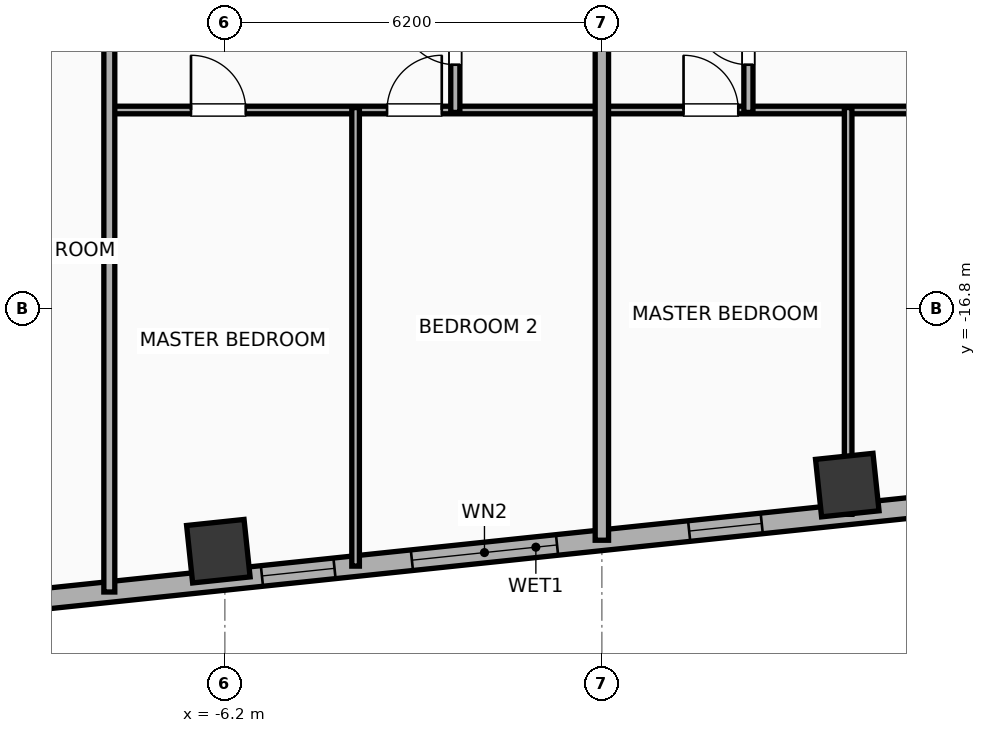
"""IFC4 building model, lengths in metres.
Left out: names, types, materials, properties, quantities, classifications, styles, units other than length and angle.
Written with IfcOpenShell. Run it as: python <this file> out.ifc"""

import sys

from ifc_helpers import new_model, si_unit, direction, frame, frame_2d, origin, origin_2d, place, context, subcontext, project, spatial, rectangle, hollow_rectangle, extrude, element, fill, save


model = new_model("IFC4")
c1 = context("Model", 3, precision=1e-05, world=origin(), true_north=direction((0.0, 1.0)))
c2 = subcontext(c1, "Body", "Model", "MODEL_VIEW")
j1 = project(units=[si_unit("LENGTHUNIT", "METRE"), si_unit("PLANEANGLEUNIT", "RADIAN")], contexts=[c1])
p1 = place(None, origin())
s1 = spatial("IfcSite", under=j1, at=p1, CompositionType="ELEMENT")
p2 = place(p1, origin())
s2 = spatial("IfcBuilding", under=s1, at=p2, CompositionType="ELEMENT")
p3 = place(p2, frame((0.0, 0.0, 187.2)))
s3 = spatial("IfcBuildingStorey", under=s2, at=p3, CompositionType="ELEMENT", Elevation=187.2)
for number, where, z_axis, x_axis in (
    (1, (-6.307, -20.785, 0.0), (0.0, 0.0, 1.0), (0.995, 0.105, 0.0)),
    (2, (4.036, -19.698, 0.0), (0.0, 0.0, 1.0), (0.995, 0.105, 0.0)),
):
    element("IfcColumn", number, at=place(p3, frame(where, z_axis=z_axis, x_axis=x_axis)), inside=s3, PredefinedType="COLUMN", context=c2, shape_type="SweptSolid", body=[
        extrude(hollow_rectangle(XDim=0.95, YDim=0.95, WallThickness=0.032, at=origin_2d()), origin(), (0.0, 0.0, 1.0), 3.9),
    ])
p4 = place(p3, frame((24.756, -18.003, 0.0), z_axis=(0.0, 0.0, 1.0), x_axis=(-0.99452160744, -0.104531202687, 0.0)))
e3 = element("IfcWall", 3, at=p4, inside=s3, PredefinedType="ELEMENTEDWALL", context=c2, shape_type="SweptSolid", body=[
    extrude(rectangle(XDim=51.967, YDim=0.34, at=frame_2d((25.983, 0.0))), origin(), (0.0, 0.0, 1.0), 3.65),
])
p5 = place(p4, frame((25.633, 0.0, 0.75)))
e4 = element("IfcOpeningElement", 4, at=p5, cuts=e3, PredefinedType="OPENING", context=c2, shape_type="SweptSolid", body=[
    extrude(rectangle(XDim=2.4, YDim=2.1, at=frame_2d((1.2, 1.05))), frame((0.0, 0.18, 0.0), z_axis=(0.0, -1.0, 0.0), x_axis=(1.0, 0.0, 0.0)), (0.0, 0.0, 1.0), 0.36),
])
p6 = place(p4, frame((42.369, 0.0, 0.75)))
e5 = element("IfcOpeningElement", 5, at=p6, cuts=e3, PredefinedType="OPENING", context=c2, shape_type="SweptSolid", body=[
    extrude(rectangle(XDim=1.2, YDim=2.05, at=frame_2d((0.6, 1.025))), frame((0.0, 0.18, 0.0), z_axis=(0.0, -1.0, 0.0), x_axis=(1.0, 0.0, 0.0)), (0.0, 0.0, 1.0), 0.36),
])
p7 = place(p4, frame((34.085, 0.0, 0.75)))
e6 = element("IfcOpeningElement", 6, at=p7, cuts=e3, PredefinedType="OPENING", context=c2, shape_type="SweptSolid", body=[
    extrude(rectangle(XDim=1.2, YDim=2.05, at=frame_2d((0.6, 1.025))), frame((0.0, 0.18, 0.0), z_axis=(0.0, -1.0, 0.0), x_axis=(1.0, 0.0, 0.0)), (0.0, 0.0, 1.0), 0.36),
])
p8 = place(p4, frame((36.993, 0.0, 0.75)))
e7 = element("IfcOpeningElement", 7, at=p8, cuts=e3, PredefinedType="OPENING", context=c2, shape_type="SweptSolid", body=[
    extrude(rectangle(XDim=1.2, YDim=2.05, at=frame_2d((0.6, 1.025))), frame((0.0, 0.18, 0.0), z_axis=(0.0, -1.0, 0.0), x_axis=(1.0, 0.0, 0.0)), (0.0, 0.0, 1.0), 0.36),
])
p9 = place(p4, frame((14.397, 0.0, 0.75)))
e8 = element("IfcOpeningElement", 8, at=p9, cuts=e3, PredefinedType="OPENING", context=c2, shape_type="SweptSolid", body=[
    extrude(rectangle(XDim=1.2, YDim=2.05, at=frame_2d((0.6, 1.025))), frame((0.0, 0.18, 0.0), z_axis=(0.0, -1.0, 0.0), x_axis=(1.0, 0.0, 0.0)), (0.0, 0.0, 1.0), 0.36),
])
p10 = place(p4, frame((11.489, 0.0, 0.75)))
e9 = element("IfcOpeningElement", 9, at=p10, cuts=e3, PredefinedType="OPENING", context=c2, shape_type="SweptSolid", body=[
    extrude(rectangle(XDim=1.2, YDim=2.05, at=frame_2d((0.6, 1.025))), frame((0.0, 0.18, 0.0), z_axis=(0.0, -1.0, 0.0), x_axis=(1.0, 0.0, 0.0)), (0.0, 0.0, 1.0), 0.36),
])
p11 = place(p4, frame((8.521, 0.0, 0.75)))
e10 = element("IfcOpeningElement", 10, at=p11, cuts=e3, PredefinedType="OPENING", context=c2, shape_type="SweptSolid", body=[
    extrude(rectangle(XDim=1.2, YDim=2.05, at=frame_2d((0.6, 1.025))), frame((0.0, 0.18, 0.0), z_axis=(0.0, -1.0, 0.0), x_axis=(1.0, 0.0, 0.0)), (0.0, 0.0, 1.0), 0.36),
])
p12 = place(p4, frame((5.582, 0.0, 0.75)))
e11 = element("IfcOpeningElement", 11, at=p12, cuts=e3, PredefinedType="OPENING", context=c2, shape_type="SweptSolid", body=[
    extrude(rectangle(XDim=1.2, YDim=2.05, at=frame_2d((0.6, 1.025))), frame((0.0, 0.18, 0.0), z_axis=(0.0, -1.0, 0.0), x_axis=(1.0, 0.0, 0.0)), (0.0, 0.0, 1.0), 0.36),
])
p13 = place(p4, frame((29.313, 0.0, 0.75)))
e12 = element("IfcOpeningElement", 12, at=p13, cuts=e3, PredefinedType="OPENING", context=c2, shape_type="SweptSolid", body=[
    extrude(rectangle(XDim=1.2, YDim=2.05, at=frame_2d((0.6, 1.025))), frame((0.0, 0.18, 0.0), z_axis=(0.0, -1.0, 0.0), x_axis=(1.0, 0.0, 0.0)), (0.0, 0.0, 1.0), 0.36),
])
p14 = place(p4, frame((22.248, 0.0, 0.75)))
e13 = element("IfcOpeningElement", 13, at=p14, cuts=e3, PredefinedType="OPENING", context=c2, shape_type="SweptSolid", body=[
    extrude(rectangle(XDim=1.2, YDim=2.05, at=frame_2d((0.6, 1.025))), frame((0.0, 0.18, 0.0), z_axis=(0.0, -1.0, 0.0), x_axis=(1.0, 0.0, 0.0)), (0.0, 0.0, 1.0), 0.36),
])
p15 = place(p4, frame((18.186, 0.0, 0.75)))
e14 = element("IfcOpeningElement", 14, at=p15, cuts=e3, PredefinedType="OPENING", context=c2, shape_type="SweptSolid", body=[
    extrude(rectangle(XDim=1.2, YDim=2.05, at=frame_2d((0.6, 1.025))), frame((0.0, 0.18, 0.0), z_axis=(0.0, -1.0, 0.0), x_axis=(1.0, 0.0, 0.0)), (0.0, 0.0, 1.0), 0.36),
])
p16 = place(p4, frame((47.879, 0.0, 0.75)))
e15 = element("IfcOpeningElement", 15, at=p16, cuts=e3, PredefinedType="OPENING", context=c2, shape_type="SweptSolid", body=[
    extrude(rectangle(XDim=1.2, YDim=2.05, at=frame_2d((0.6, 1.025))), frame((0.0, 0.18, 0.0), z_axis=(0.0, -1.0, 0.0), x_axis=(1.0, 0.0, 0.0)), (0.0, 0.0, 1.0), 0.36),
])
p17 = place(p4, frame((49.844, 0.0, 0.75)))
e16 = element("IfcOpeningElement", 16, at=p17, cuts=e3, PredefinedType="OPENING", context=c2, shape_type="SweptSolid", body=[
    extrude(rectangle(XDim=1.2, YDim=2.05, at=frame_2d((0.6, 1.025))), frame((0.0, 0.18, 0.0), z_axis=(0.0, -1.0, 0.0), x_axis=(1.0, 0.0, 0.0)), (0.0, 0.0, 1.0), 0.36),
])
p18 = place(p4, frame((0.925, 0.0, 0.75)))
e17 = element("IfcOpeningElement", 17, at=p18, cuts=e3, PredefinedType="OPENING", context=c2, shape_type="SweptSolid", body=[
    extrude(rectangle(XDim=1.2, YDim=2.05, at=frame_2d((0.6, 1.025))), frame((0.0, 0.18, 0.0), z_axis=(0.0, -1.0, 0.0), x_axis=(1.0, 0.0, 0.0)), (0.0, 0.0, 1.0), 0.36),
])
p19 = place(p3, frame((-8.08, -13.53, 0.0), z_axis=(0.0, 0.0, 1.0), x_axis=(1.0, 0.0, 0.0)))
e18 = element("IfcWall", 18, at=p19, inside=s3, PredefinedType="PARTITIONING", context=c2, shape_type="SweptSolid", body=[
    extrude(rectangle(XDim=8.06, YDim=0.125, at=frame_2d((4.03, 0.0))), origin(), (0.0, 0.0, 1.0), 3.65),
])
p20 = place(p19, frame((1.323, 0.0, 0.0)))
e19 = element("IfcOpeningElement", 19, at=p20, cuts=e18, PredefinedType="OPENING", context=c2, shape_type="SweptSolid", body=[
    extrude(rectangle(XDim=0.9, YDim=2.05, at=frame_2d((0.45, 1.025))), frame((0.0, 0.073, 0.0), z_axis=(0.0, -1.0, 0.0), x_axis=(1.0, 0.0, 0.0)), (0.0, 0.0, 1.0), 0.145),
])
p21 = place(p19, frame((4.547, 0.0, 0.0)))
e20 = element("IfcOpeningElement", 20, at=p21, cuts=e18, PredefinedType="OPENING", context=c2, shape_type="SweptSolid", body=[
    extrude(rectangle(XDim=0.9, YDim=2.05, at=frame_2d((0.45, 1.025))), frame((0.0, 0.073, 0.0), z_axis=(0.0, -1.0, 0.0), x_axis=(1.0, 0.0, 0.0)), (0.0, 0.0, 1.0), 0.145),
])
p22 = place(p3, frame((-2.41, -13.57, 0.0), z_axis=(0.0, 0.0, 1.0), x_axis=(0.0, 1.0, 0.0)))
e21 = element("IfcWall", 21, at=p22, inside=s3, PredefinedType="PLUMBINGWALL", context=c2, shape_type="SweptSolid", body=[
    extrude(rectangle(XDim=2.47, YDim=0.15, at=frame_2d((1.235, 0.0))), origin(), (0.0, 0.0, 1.0), 3.65),
])
p23 = place(p22, frame((0.785, 0.0, 0.0)))
e22 = element("IfcOpeningElement", 22, at=p23, cuts=e21, PredefinedType="OPENING", context=c2, shape_type="SweptSolid", body=[
    extrude(rectangle(XDim=0.9, YDim=2.05, at=frame_2d((0.45, 1.025))), frame((0.0, 0.085, 0.0), z_axis=(0.0, -1.0, 0.0), x_axis=(1.0, 0.0, 0.0)), (0.0, 0.0, 1.0), 0.17),
])
p24 = place(p3, frame((-4.05, -21.031, 0.0), z_axis=(0.0, 0.0, 1.0), x_axis=(0.0, 1.0, 0.0)))
e23 = element("IfcWall", 23, at=p24, inside=s3, PredefinedType="PARTITIONING", context=c2, shape_type="SweptSolid", body=[
    extrude(rectangle(XDim=7.541, YDim=0.125, at=frame_2d((3.771, 0.0))), origin(), (0.0, 0.0, 1.0), 3.65),
])
p25 = place(p3, frame((-8.1, -21.456, 0.0), z_axis=(0.0, 0.0, 1.0), x_axis=(0.0, 1.0, 0.0)))
e24 = element("IfcWall", 24, at=p25, inside=s3, PredefinedType="PARTITIONING", context=c2, shape_type="SweptSolid", body=[
    extrude(rectangle(XDim=12.766, YDim=0.18, at=frame_2d((6.383, 0.0))), origin(), (0.0, 0.0, 1.0), 3.65),
])
p26 = place(p25, frame((11.516, 0.0, 0.0)))
e25 = element("IfcOpeningElement", 25, at=p26, cuts=e24, PredefinedType="OPENING", context=c2, shape_type="SweptSolid", body=[
    extrude(rectangle(XDim=0.9, YDim=2.05, at=frame_2d((0.45, 1.025))), frame((0.0, 0.1, 0.0), z_axis=(0.0, -1.0, 0.0), x_axis=(1.0, 0.0, 0.0)), (0.0, 0.0, 1.0), 0.2),
])
p27 = place(p3, frame((0.02, -13.53, 0.0), z_axis=(0.0, 0.0, 1.0), x_axis=(1.0, 0.0, 0.0)))
e26 = element("IfcWall", 26, at=p27, inside=s3, PredefinedType="PARTITIONING", context=c2, shape_type="SweptSolid", body=[
    extrude(rectangle(XDim=8.06, YDim=0.125, at=frame_2d((4.03, 0.0))), origin(), (0.0, 0.0, 1.0), 3.65),
])
p28 = place(p27, frame((1.323, 0.0, 0.0)))
e27 = element("IfcOpeningElement", 27, at=p28, cuts=e26, PredefinedType="OPENING", context=c2, shape_type="SweptSolid", body=[
    extrude(rectangle(XDim=0.9, YDim=2.05, at=frame_2d((0.45, 1.025))), frame((0.0, 0.073, 0.0), z_axis=(0.0, -1.0, 0.0), x_axis=(1.0, 0.0, 0.0)), (0.0, 0.0, 1.0), 0.145),
])
p29 = place(p27, frame((5.837, 0.0, 0.0)))
e28 = element("IfcOpeningElement", 28, at=p29, cuts=e26, PredefinedType="OPENING", context=c2, shape_type="SweptSolid", body=[
    extrude(rectangle(XDim=0.9, YDim=2.05, at=frame_2d((0.45, 1.025))), frame((0.0, 0.073, 0.0), z_axis=(0.0, -1.0, 0.0), x_axis=(1.0, 0.0, 0.0)), (0.0, 0.0, 1.0), 0.145),
])
p30 = place(p3, frame((2.41, -13.57, 0.0), z_axis=(0.0, 0.0, 1.0), x_axis=(0.0, 1.0, 0.0)))
e29 = element("IfcWall", 29, at=p30, inside=s3, PredefinedType="PLUMBINGWALL", context=c2, shape_type="SweptSolid", body=[
    extrude(rectangle(XDim=2.47, YDim=0.15, at=frame_2d((1.235, 0.0))), origin(), (0.0, 0.0, 1.0), 3.65),
])
p31 = place(p30, frame((0.785, 0.0, 0.0)))
e30 = element("IfcOpeningElement", 30, at=p31, cuts=e29, PredefinedType="OPENING", context=c2, shape_type="SweptSolid", body=[
    extrude(rectangle(XDim=0.9, YDim=2.05, at=frame_2d((0.45, 1.025))), frame((0.0, 0.085, 0.0), z_axis=(0.0, -1.0, 0.0), x_axis=(1.0, 0.0, 0.0)), (0.0, 0.0, 1.0), 0.17),
])
p32 = place(p3, frame((4.05, -20.179, 0.0), z_axis=(0.0, 0.0, 1.0), x_axis=(0.0, 1.0, 0.0)))
e31 = element("IfcWall", 31, at=p32, inside=s3, PredefinedType="PARTITIONING", context=c2, shape_type="SweptSolid", body=[
    extrude(rectangle(XDim=6.689, YDim=0.125, at=frame_2d((3.345, 0.0))), origin(), (0.0, 0.0, 1.0), 3.04),
])
p33 = place(p3, frame((0.0, -20.605, 0.0), z_axis=(0.0, 0.0, 1.0), x_axis=(0.0, 1.0, 0.0)))
e32 = element("IfcWall", 32, at=p33, inside=s3, PredefinedType="PARTITIONING", context=c2, shape_type="SweptSolid", body=[
    extrude(rectangle(XDim=11.915, YDim=0.22, at=frame_2d((5.958, 0.0))), origin(), (0.0, 0.0, 1.0), 3.65),
])
p34 = place(p5, origin())
e33 = element("IfcWindow", 33, at=p34, inside=s3, PartitioningType="SINGLE_PANEL", PredefinedType="WINDOW", context=c2, shape_type="SweptSolid", body=[
    extrude(rectangle(XDim=2.4, YDim=2.1, at=frame_2d((1.2, 1.05))), frame((0.0, 0.03, 0.0), z_axis=(0.0, -1.0, 0.0), x_axis=(1.0, 0.0, 0.0)), (0.0, 0.0, 1.0), 0.06),
])
fill(e4, e33)
p35 = place(p13, origin())
e34 = element("IfcWindow", 34, at=p35, inside=s3, PartitioningType="SINGLE_PANEL", PredefinedType="WINDOW", context=c2, shape_type="SweptSolid", body=[
    extrude(rectangle(XDim=1.2, YDim=2.05, at=frame_2d((0.6, 1.025))), frame((0.0, 0.03, 0.0), z_axis=(0.0, -1.0, 0.0), x_axis=(1.0, 0.0, 0.0)), (0.0, 0.0, 1.0), 0.06),
])
fill(e12, e34)
p36 = place(p14, origin())
e35 = element("IfcWindow", 35, at=p36, inside=s3, PartitioningType="SINGLE_PANEL", PredefinedType="WINDOW", context=c2, shape_type="SweptSolid", body=[
    extrude(rectangle(XDim=1.2, YDim=2.05, at=frame_2d((0.6, 1.025))), frame((0.0, 0.03, 0.0), z_axis=(0.0, -1.0, 0.0), x_axis=(1.0, 0.0, 0.0)), (0.0, 0.0, 1.0), 0.06),
])
fill(e13, e35)
p37 = place(p20, origin())
e36 = element("IfcDoor", 36, at=p37, inside=s3, OperationType="SINGLE_SWING_LEFT", PredefinedType="DOOR", context=c2, shape_type="SweptSolid", body=[
    extrude(rectangle(XDim=0.9, YDim=2.05, at=frame_2d((0.45, 1.025))), frame((0.0, 0.025, 0.0), z_axis=(0.0, -1.0, 0.0), x_axis=(1.0, 0.0, 0.0)), (0.0, 0.0, 1.0), 0.05),
])
fill(e19, e36)
p38 = place(p21, origin())
e37 = element("IfcDoor", 37, at=p38, inside=s3, OperationType="SINGLE_SWING_RIGHT", PredefinedType="DOOR", context=c2, shape_type="SweptSolid", body=[
    extrude(rectangle(XDim=0.9, YDim=2.05, at=frame_2d((0.45, 1.025))), frame((0.0, 0.025, 0.0), z_axis=(0.0, -1.0, 0.0), x_axis=(1.0, 0.0, 0.0)), (0.0, 0.0, 1.0), 0.05),
])
fill(e20, e37)
p39 = place(p23, origin())
e38 = element("IfcDoor", 38, at=p39, inside=s3, OperationType="SINGLE_SWING_RIGHT", PredefinedType="DOOR", context=c2, shape_type="SweptSolid", body=[
    extrude(rectangle(XDim=0.9, YDim=2.05, at=frame_2d((0.45, 1.025))), frame((0.0, 0.025, 0.0), z_axis=(0.0, -1.0, 0.0), x_axis=(1.0, 0.0, 0.0)), (0.0, 0.0, 1.0), 0.05),
])
fill(e22, e38)
p40 = place(p28, origin())
e39 = element("IfcDoor", 39, at=p40, inside=s3, OperationType="SINGLE_SWING_LEFT", PredefinedType="DOOR", context=c2, shape_type="SweptSolid", body=[
    extrude(rectangle(XDim=0.9, YDim=2.05, at=frame_2d((0.45, 1.025))), frame((0.0, 0.025, 0.0), z_axis=(0.0, -1.0, 0.0), x_axis=(1.0, 0.0, 0.0)), (0.0, 0.0, 1.0), 0.05),
])
fill(e27, e39)
p41 = place(p31, origin())
e40 = element("IfcDoor", 40, at=p41, inside=s3, OperationType="SINGLE_SWING_RIGHT", PredefinedType="DOOR", context=c2, shape_type="SweptSolid", body=[
    extrude(rectangle(XDim=0.9, YDim=2.05, at=frame_2d((0.45, 1.025))), frame((0.0, 0.025, 0.0), z_axis=(0.0, -1.0, 0.0), x_axis=(1.0, 0.0, 0.0)), (0.0, 0.0, 1.0), 0.05),
])
fill(e30, e40)
save(model, sys.argv[1])
